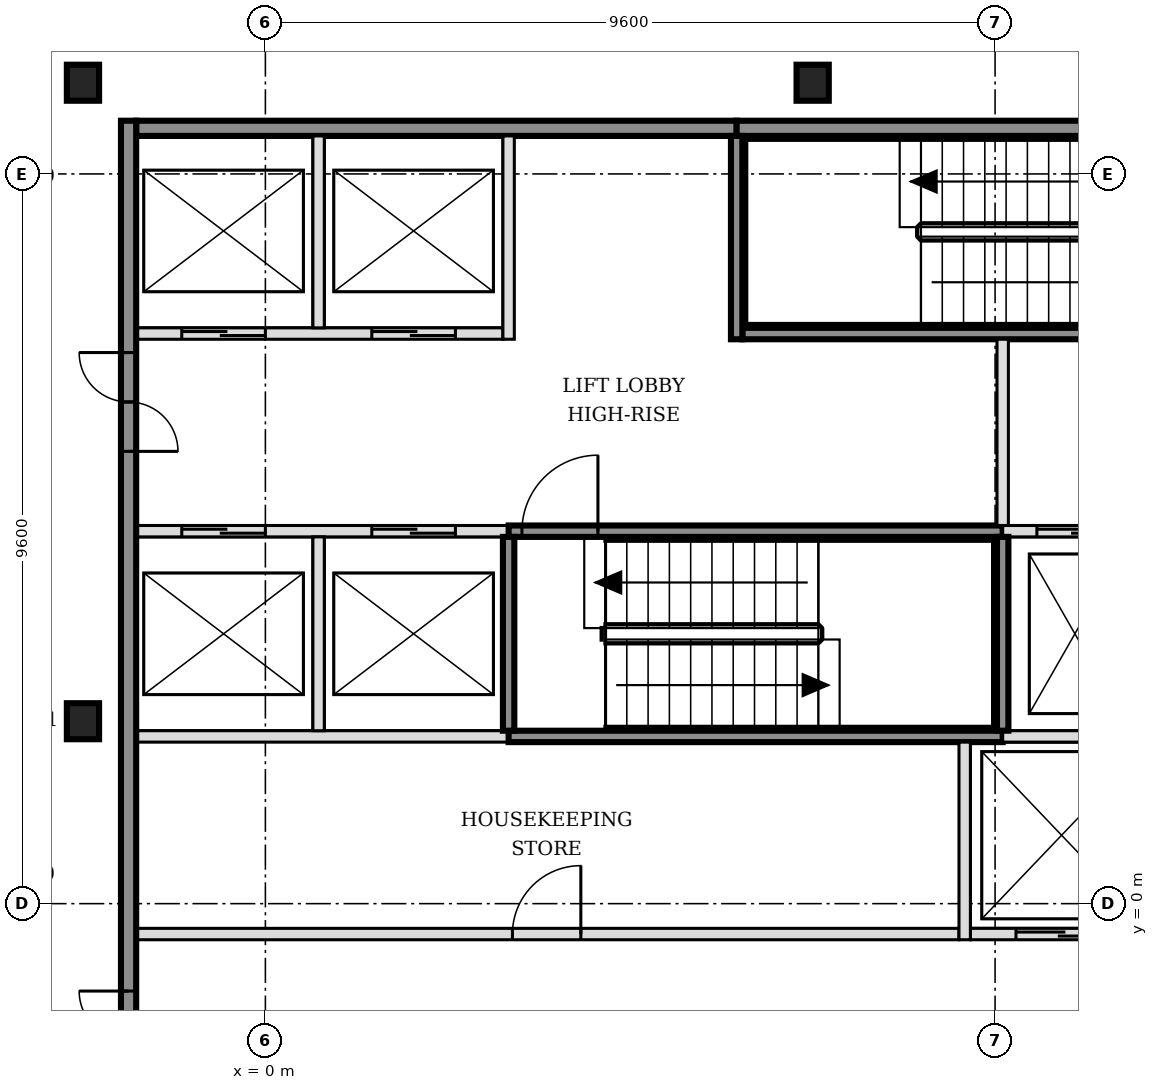
"""IFC4 building model, lengths in metres.
Left out: names, types, materials, properties, quantities, classifications, styles, units other than length and angle.
Written with IfcOpenShell. Run it as: python <this file> out.ifc"""

import sys

from ifc_helpers import new_model, si_unit, direction, frame, frame_2d, origin, origin_2d, place, context, subcontext, project, spatial, rectangle, i_section, extrude, element, fill, save


model = new_model("IFC4")
c1 = context("Model", 3, precision=1e-05, world=origin(), true_north=direction((0.0, 1.0)))
c2 = subcontext(c1, "Body", "Model", "MODEL_VIEW")
j1 = project(units=[si_unit("LENGTHUNIT", "METRE"), si_unit("PLANEANGLEUNIT", "RADIAN")], contexts=[c1])
p1 = place(None, origin())
s1 = spatial("IfcSite", under=j1, at=p1, CompositionType="ELEMENT")
p2 = place(p1, origin())
s2 = spatial("IfcBuilding", under=s1, at=p2, CompositionType="ELEMENT")
p3 = place(p2, frame((0.0, 0.0, 147.0)))
s3 = spatial("IfcBuildingStorey", under=s2, at=p3, CompositionType="ELEMENT", Elevation=147.0)
for number, where, z_axis, x_axis in (
    (1, (-2.4, 2.4, -0.15), (0.0, 0.0, 1.0), (1.0, 0.0, 0.0)),
    (2, (-2.4, 10.8, -0.15), (0.0, 0.0, 1.0), (1.0, 0.0, 0.0)),
    (3, (7.2, 10.8, -0.15), (0.0, 0.0, 1.0), (1.0, 0.0, 0.0)),
):
    element("IfcColumn", number, at=place(p3, frame(where, z_axis=z_axis, x_axis=x_axis)), inside=s3, PredefinedType="COLUMN", context=c2, shape_type="SweptSolid", body=[
        extrude(i_section(OverallWidth=0.424, OverallDepth=0.474, WebThickness=0.048, FlangeThickness=0.077, FilletRadius=0.015, at=origin_2d()), origin(), (0.0, 0.0, 1.0), 3.6),
    ])
p4 = place(p3, frame((-1.7, -0.4, 0.0), z_axis=(0.0, 0.0, 1.0), x_axis=(1.0, 0.0, 0.0)))
e4 = element("IfcWall", 4, at=p4, inside=s3, PredefinedType="PARTITIONING", context=c2, shape_type="SweptSolid", body=[
    extrude(rectangle(XDim=10.825, YDim=0.15, at=frame_2d((5.413, 0.0))), origin(), (0.0, 0.0, 1.0), 3.45),
])
p5 = place(p4, frame((4.95, 0.0, 0.0)))
e5 = element("IfcOpeningElement", 5, at=p5, cuts=e4, PredefinedType="OPENING", context=c2, shape_type="SweptSolid", body=[
    extrude(rectangle(XDim=0.9, YDim=2.1, at=frame_2d((0.45, 1.05))), frame((0.0, 0.085, 0.0), z_axis=(0.0, -1.0, 0.0), x_axis=(1.0, 0.0, 0.0)), (0.0, 0.0, 1.0), 0.17),
])
p6 = place(p3, frame((9.275, -0.4, 0.0), z_axis=(0.0, 0.0, 1.0), x_axis=(1.0, 0.0, 0.0)))
e6 = element("IfcWall", 6, at=p6, inside=s3, PredefinedType="SOLIDWALL", context=c2, shape_type="SweptSolid", body=[
    extrude(rectangle(XDim=4.95, YDim=0.15, at=frame_2d((2.475, 0.0))), origin(), (0.0, 0.0, 1.0), 3.45),
])
p7 = place(p6, frame((0.6, 0.0, 0.0)))
e7 = element("IfcOpeningElement", 7, at=p7, cuts=e6, PredefinedType="OPENING", context=c2, shape_type="SweptSolid", body=[
    extrude(rectangle(XDim=1.2, YDim=2.1, at=frame_2d((0.6, 1.05))), frame((0.0, 0.085, 0.0), z_axis=(0.0, -1.0, 0.0), x_axis=(1.0, 0.0, 0.0)), (0.0, 0.0, 1.0), 0.17),
])
p8 = place(p6, frame((3.15, 0.0, 0.0)))
e8 = element("IfcOpeningElement", 8, at=p8, cuts=e6, PredefinedType="OPENING", context=c2, shape_type="SweptSolid", body=[
    extrude(rectangle(XDim=1.2, YDim=2.1, at=frame_2d((0.6, 1.05))), frame((0.0, 0.085, 0.0), z_axis=(0.0, -1.0, 0.0), x_axis=(1.0, 0.0, 0.0)), (0.0, 0.0, 1.0), 0.17),
])
p9 = place(p3, frame((-1.7, 2.2, 0.0), z_axis=(0.0, 0.0, 1.0), x_axis=(1.0, 0.0, 0.0)))
e9 = element("IfcWall", 9, at=p9, inside=s3, PredefinedType="SOLIDWALL", context=c2, shape_type="SweptSolid", body=[
    extrude(rectangle(XDim=4.9, YDim=0.15, at=frame_2d((2.45, 0.0))), origin(), (0.0, 0.0, 1.0), 3.45),
])
p10 = place(p3, frame((3.2, 2.2, 0.0), z_axis=(0.0, 0.0, 1.0), x_axis=(1.0, 0.0, 0.0)))
e10 = element("IfcWall", 10, at=p10, inside=s3, PredefinedType="SOLIDWALL", context=c2, shape_type="SweptSolid", body=[
    extrude(rectangle(XDim=6.5, YDim=0.15, at=frame_2d((3.25, 0.0))), origin(), (0.0, 0.0, 1.0), 3.45),
])
p11 = place(p3, frame((9.7, 2.2, 0.0), z_axis=(0.0, 0.0, 1.0), x_axis=(1.0, 0.0, 0.0)))
e11 = element("IfcWall", 11, at=p11, inside=s3, PredefinedType="SOLIDWALL", context=c2, shape_type="SweptSolid", body=[
    extrude(rectangle(XDim=4.525, YDim=0.15, at=frame_2d((2.263, 0.0))), origin(), (0.0, 0.0, 1.0), 3.45),
])
p12 = place(p3, frame((-1.7, 4.9, 0.0), z_axis=(0.0, 0.0, 1.0), x_axis=(1.0, 0.0, 0.0)))
e12 = element("IfcWall", 12, at=p12, inside=s3, PredefinedType="SOLIDWALL", context=c2, shape_type="SweptSolid", body=[
    extrude(rectangle(XDim=4.9, YDim=0.15, at=frame_2d((2.45, 0.0))), origin(), (0.0, 0.0, 1.0), 3.45),
])
p13 = place(p12, frame((0.6, 0.0, 0.0)))
e13 = element("IfcOpeningElement", 13, at=p13, cuts=e12, PredefinedType="OPENING", context=c2, shape_type="SweptSolid", body=[
    extrude(rectangle(XDim=1.1, YDim=2.1, at=frame_2d((0.55, 1.05))), frame((0.0, 0.085, 0.0), z_axis=(0.0, -1.0, 0.0), x_axis=(1.0, 0.0, 0.0)), (0.0, 0.0, 1.0), 0.17),
])
p14 = place(p12, frame((3.1, 0.0, 0.0)))
e14 = element("IfcOpeningElement", 14, at=p14, cuts=e12, PredefinedType="OPENING", context=c2, shape_type="SweptSolid", body=[
    extrude(rectangle(XDim=1.1, YDim=2.1, at=frame_2d((0.55, 1.05))), frame((0.0, 0.085, 0.0), z_axis=(0.0, -1.0, 0.0), x_axis=(1.0, 0.0, 0.0)), (0.0, 0.0, 1.0), 0.17),
])
p15 = place(p3, frame((3.2, 4.9, 0.0), z_axis=(0.0, 0.0, 1.0), x_axis=(1.0, 0.0, 0.0)))
e15 = element("IfcWall", 15, at=p15, inside=s3, PredefinedType="SOLIDWALL", context=c2, shape_type="SweptSolid", body=[
    extrude(rectangle(XDim=6.5, YDim=0.15, at=frame_2d((3.25, 0.0))), origin(), (0.0, 0.0, 1.0), 3.45),
])
p16 = place(p15, frame((0.175, 0.0, 0.0)))
e16 = element("IfcOpeningElement", 16, at=p16, cuts=e15, PredefinedType="OPENING", context=c2, shape_type="SweptSolid", body=[
    extrude(rectangle(XDim=1.0, YDim=2.1, at=frame_2d((0.5, 1.05))), frame((0.0, 0.085, 0.0), z_axis=(0.0, -1.0, 0.0), x_axis=(1.0, 0.0, 0.0)), (0.0, 0.0, 1.0), 0.17),
])
p17 = place(p3, frame((9.7, 4.9, 0.0), z_axis=(0.0, 0.0, 1.0), x_axis=(1.0, 0.0, 0.0)))
e17 = element("IfcWall", 17, at=p17, inside=s3, PredefinedType="SOLIDWALL", context=c2, shape_type="SweptSolid", body=[
    extrude(rectangle(XDim=6.4, YDim=0.15, at=frame_2d((3.2, 0.0))), origin(), (0.0, 0.0, 1.0), 3.45),
])
p18 = place(p17, frame((0.45, 0.0, 0.0)))
e18 = element("IfcOpeningElement", 18, at=p18, cuts=e17, PredefinedType="OPENING", context=c2, shape_type="SweptSolid", body=[
    extrude(rectangle(XDim=1.0, YDim=2.1, at=frame_2d((0.5, 1.05))), frame((0.0, 0.085, 0.0), z_axis=(0.0, -1.0, 0.0), x_axis=(1.0, 0.0, 0.0)), (0.0, 0.0, 1.0), 0.17),
])
p19 = place(p17, frame((2.35, 0.0, 0.0)))
e19 = element("IfcOpeningElement", 19, at=p19, cuts=e17, PredefinedType="OPENING", context=c2, shape_type="SweptSolid", body=[
    extrude(rectangle(XDim=1.0, YDim=2.1, at=frame_2d((0.5, 1.05))), frame((0.0, 0.085, 0.0), z_axis=(0.0, -1.0, 0.0), x_axis=(1.0, 0.0, 0.0)), (0.0, 0.0, 1.0), 0.17),
])
p20 = place(p17, frame((4.7, 0.0, 0.0)))
e20 = element("IfcOpeningElement", 20, at=p20, cuts=e17, PredefinedType="OPENING", context=c2, shape_type="SweptSolid", body=[
    extrude(rectangle(XDim=0.9, YDim=2.1, at=frame_2d((0.45, 1.05))), frame((0.0, 0.085, 0.0), z_axis=(0.0, -1.0, 0.0), x_axis=(1.0, 0.0, 0.0)), (0.0, 0.0, 1.0), 0.17),
])
p21 = place(p3, frame((-1.7, 7.5, 0.0), z_axis=(0.0, 0.0, 1.0), x_axis=(1.0, 0.0, 0.0)))
e21 = element("IfcWall", 21, at=p21, inside=s3, PredefinedType="SOLIDWALL", context=c2, shape_type="SweptSolid", body=[
    extrude(rectangle(XDim=4.825, YDim=0.15, at=frame_2d((2.413, 0.0))), origin(), (0.0, 0.0, 1.0), 3.45),
])
p22 = place(p21, frame((0.6, 0.0, 0.0)))
e22 = element("IfcOpeningElement", 22, at=p22, cuts=e21, PredefinedType="OPENING", context=c2, shape_type="SweptSolid", body=[
    extrude(rectangle(XDim=1.1, YDim=2.1, at=frame_2d((0.55, 1.05))), frame((0.0, 0.085, 0.0), z_axis=(0.0, -1.0, 0.0), x_axis=(1.0, 0.0, 0.0)), (0.0, 0.0, 1.0), 0.17),
])
p23 = place(p21, frame((3.1, 0.0, 0.0)))
e23 = element("IfcOpeningElement", 23, at=p23, cuts=e21, PredefinedType="OPENING", context=c2, shape_type="SweptSolid", body=[
    extrude(rectangle(XDim=1.1, YDim=2.1, at=frame_2d((0.55, 1.05))), frame((0.0, 0.085, 0.0), z_axis=(0.0, -1.0, 0.0), x_axis=(1.0, 0.0, 0.0)), (0.0, 0.0, 1.0), 0.17),
])
p24 = place(p3, frame((6.275, 7.5, 0.0), z_axis=(0.0, 0.0, 1.0), x_axis=(1.0, 0.0, 0.0)))
e24 = element("IfcWall", 24, at=p24, inside=s3, PredefinedType="SOLIDWALL", context=c2, shape_type="SweptSolid", body=[
    extrude(rectangle(XDim=6.425, YDim=0.15, at=frame_2d((3.212, 0.0))), origin(), (0.0, 0.0, 1.0), 3.45),
])
p25 = place(p24, frame((5.225, 0.0, 0.0)))
e25 = element("IfcOpeningElement", 25, at=p25, cuts=e24, PredefinedType="OPENING", context=c2, shape_type="SweptSolid", body=[
    extrude(rectangle(XDim=1.0, YDim=2.1, at=frame_2d((0.5, 1.05))), frame((0.0, 0.085, 0.0), z_axis=(0.0, -1.0, 0.0), x_axis=(1.0, 0.0, 0.0)), (0.0, 0.0, 1.0), 0.17),
])
p26 = place(p3, frame((-1.7, 10.2, 0.0), z_axis=(0.0, 0.0, 1.0), x_axis=(1.0, 0.0, 0.0)))
e26 = element("IfcWall", 26, at=p26, inside=s3, PredefinedType="SOLIDWALL", context=c2, shape_type="SweptSolid", body=[
    extrude(rectangle(XDim=7.9, YDim=0.2, at=frame_2d((3.95, 0.0))), origin(), (0.0, 0.0, 1.0), 3.45),
])
p27 = place(p3, frame((6.2, 10.2, 0.0), z_axis=(0.0, 0.0, 1.0), x_axis=(1.0, 0.0, 0.0)))
e27 = element("IfcWall", 27, at=p27, inside=s3, PredefinedType="SOLIDWALL", context=c2, shape_type="SweptSolid", body=[
    extrude(rectangle(XDim=6.5, YDim=0.2, at=frame_2d((3.25, 0.0))), origin(), (0.0, 0.0, 1.0), 3.45),
])
p28 = place(p3, frame((-1.8, -5.5, 0.0), z_axis=(0.0, 0.0, 1.0), x_axis=(0.0, 1.0, 0.0)))
e28 = element("IfcWall", 28, at=p28, inside=s3, PredefinedType="SOLIDWALL", context=c2, shape_type="SweptSolid", body=[
    extrude(rectangle(XDim=15.8, YDim=0.2, at=frame_2d((7.9, 0.0))), origin(), (0.0, 0.0, 1.0), 3.45),
])
p29 = place(p28, frame((3.05, 0.0, 0.0)))
e29 = element("IfcOpeningElement", 29, at=p29, cuts=e28, PredefinedType="OPENING", context=c2, shape_type="SweptSolid", body=[
    extrude(rectangle(XDim=1.3, YDim=2.1, at=frame_2d((0.65, 1.05))), frame((0.0, 0.11, 0.0), z_axis=(0.0, -1.0, 0.0), x_axis=(1.0, 0.0, 0.0)), (0.0, 0.0, 1.0), 0.22),
])
p30 = place(p28, frame((11.45, 0.0, 0.0)))
e30 = element("IfcOpeningElement", 30, at=p30, cuts=e28, PredefinedType="OPENING", context=c2, shape_type="SweptSolid", body=[
    extrude(rectangle(XDim=1.3, YDim=2.1, at=frame_2d((0.65, 1.05))), frame((0.0, 0.11, 0.0), z_axis=(0.0, -1.0, 0.0), x_axis=(1.0, 0.0, 0.0)), (0.0, 0.0, 1.0), 0.22),
])
p31 = place(p3, frame((0.7, 2.275, 0.0), z_axis=(0.0, 0.0, 1.0), x_axis=(0.0, 1.0, 0.0)))
e31 = element("IfcWall", 31, at=p31, inside=s3, PredefinedType="SOLIDWALL", context=c2, shape_type="SweptSolid", body=[
    extrude(rectangle(XDim=2.55, YDim=0.15, at=frame_2d((1.275, 0.0))), origin(), (0.0, 0.0, 1.0), 3.45),
])
p32 = place(p3, frame((0.7, 7.575, 0.0), z_axis=(0.0, 0.0, 1.0), x_axis=(0.0, 1.0, 0.0)))
e32 = element("IfcWall", 32, at=p32, inside=s3, PredefinedType="SOLIDWALL", context=c2, shape_type="SweptSolid", body=[
    extrude(rectangle(XDim=2.525, YDim=0.15, at=frame_2d((1.263, 0.0))), origin(), (0.0, 0.0, 1.0), 3.45),
])
p33 = place(p3, frame((3.2, 2.275, 0.0), z_axis=(0.0, 0.0, 1.0), x_axis=(0.0, 1.0, 0.0)))
e33 = element("IfcWall", 33, at=p33, inside=s3, PredefinedType="SOLIDWALL", context=c2, shape_type="SweptSolid", body=[
    extrude(rectangle(XDim=2.55, YDim=0.15, at=frame_2d((1.275, 0.0))), origin(), (0.0, 0.0, 1.0), 3.45),
])
for number, where, z_axis, x_axis in (
    (34, (3.2, 7.425, 0.0), (0.0, 0.0, 1.0), (0.0, 1.0, 0.0)),
    (35, (6.2, 7.425, 0.0), (0.0, 0.0, 1.0), (0.0, 1.0, 0.0)),
):
    element("IfcWall", number, at=place(p3, frame(where, z_axis=z_axis, x_axis=x_axis)), inside=s3, PredefinedType="SOLIDWALL", context=c2, shape_type="SweptSolid", body=[
        extrude(rectangle(XDim=2.675, YDim=0.15, at=frame_2d((1.337, 0.0))), origin(), (0.0, 0.0, 1.0), 3.45),
    ])
p34 = place(p3, frame((9.2, -0.475, 0.0), z_axis=(0.0, 0.0, 1.0), x_axis=(0.0, 1.0, 0.0)))
e36 = element("IfcWall", 36, at=p34, inside=s3, PredefinedType="SOLIDWALL", context=c2, shape_type="SweptSolid", body=[
    extrude(rectangle(XDim=2.6, YDim=0.15, at=frame_2d((1.3, 0.0))), origin(), (0.0, 0.0, 1.0), 3.45),
])
p35 = place(p3, frame((9.7, 2.275, 0.0), z_axis=(0.0, 0.0, 1.0), x_axis=(0.0, 1.0, 0.0)))
e37 = element("IfcWall", 37, at=p35, inside=s3, PredefinedType="SOLIDWALL", context=c2, shape_type="SweptSolid", body=[
    extrude(rectangle(XDim=2.55, YDim=0.15, at=frame_2d((1.275, 0.0))), origin(), (0.0, 0.0, 1.0), 3.45),
])
p36 = place(p3, frame((9.7, 4.975, 0.0), z_axis=(0.0, 0.0, 1.0), x_axis=(0.0, 1.0, 0.0)))
e38 = element("IfcWall", 38, at=p36, inside=s3, PredefinedType="SOLIDWALL", context=c2, shape_type="SweptSolid", body=[
    extrude(rectangle(XDim=2.45, YDim=0.15, at=frame_2d((1.225, 0.0))), origin(), (0.0, 0.0, 1.0), 3.45),
])
p37 = place(p3, frame((-12.075, 9.319, 0.0), z_axis=(0.0, 0.0, 1.0), x_axis=(0.707106781187, 0.707106781187, 0.0)))
e39 = element("IfcWall", 39, at=p37, inside=s3, PredefinedType="PARTITIONING", context=c2, shape_type="SweptSolid", body=[
    extrude(rectangle(XDim=13.793, YDim=0.15, at=frame_2d((6.896, 0.0))), origin(), (0.0, 0.0, 1.0), 2.73),
])
p38 = place(p37, frame((11.692, 0.0, 0.0)))
e40 = element("IfcOpeningElement", 40, at=p38, cuts=e39, PredefinedType="OPENING", context=c2, shape_type="SweptSolid", body=[
    extrude(rectangle(XDim=0.9, YDim=2.1, at=frame_2d((0.45, 1.05))), frame((0.0, 0.085, 0.0), z_axis=(0.0, -1.0, 0.0), x_axis=(1.0, 0.0, 0.0)), (0.0, 0.0, 1.0), 0.17),
])
p39 = place(p37, frame((7.376, 0.0, 0.0)))
e41 = element("IfcOpeningElement", 41, at=p39, cuts=e39, PredefinedType="OPENING", context=c2, shape_type="SweptSolid", body=[
    extrude(rectangle(XDim=0.9, YDim=2.1, at=frame_2d((0.45, 1.05))), frame((0.0, 0.085, 0.0), z_axis=(0.0, -1.0, 0.0), x_axis=(1.0, 0.0, 0.0)), (0.0, 0.0, 1.0), 0.17),
])
p40 = place(p37, frame((3.62, 0.0, 0.0)))
e42 = element("IfcOpeningElement", 42, at=p40, cuts=e39, PredefinedType="OPENING", context=c2, shape_type="SweptSolid", body=[
    extrude(rectangle(XDim=0.9, YDim=2.1, at=frame_2d((0.45, 1.05))), frame((0.0, 0.085, 0.0), z_axis=(0.0, -1.0, 0.0), x_axis=(1.0, 0.0, 0.0)), (0.0, 0.0, 1.0), 0.17),
])
p41 = place(p7, origin())
e43 = element("IfcDoor", 43, at=p41, inside=s3, OperationType="DOUBLE_DOOR_SLIDING", PredefinedType="DOOR", context=c2, shape_type="SweptSolid", body=[
    extrude(rectangle(XDim=1.2, YDim=2.1, at=frame_2d((0.6, 1.05))), frame((0.0, 0.025, 0.0), z_axis=(0.0, -1.0, 0.0), x_axis=(1.0, 0.0, 0.0)), (0.0, 0.0, 1.0), 0.05),
])
fill(e7, e43)
p42 = place(p13, origin())
e44 = element("IfcDoor", 44, at=p42, inside=s3, OperationType="DOUBLE_DOOR_SLIDING", PredefinedType="DOOR", context=c2, shape_type="SweptSolid", body=[
    extrude(rectangle(XDim=1.1, YDim=2.1, at=frame_2d((0.55, 1.05))), frame((0.0, 0.025, 0.0), z_axis=(0.0, -1.0, 0.0), x_axis=(1.0, 0.0, 0.0)), (0.0, 0.0, 1.0), 0.05),
])
fill(e13, e44)
p43 = place(p14, origin())
e45 = element("IfcDoor", 45, at=p43, inside=s3, OperationType="DOUBLE_DOOR_SLIDING", PredefinedType="DOOR", context=c2, shape_type="SweptSolid", body=[
    extrude(rectangle(XDim=1.1, YDim=2.1, at=frame_2d((0.55, 1.05))), frame((0.0, 0.025, 0.0), z_axis=(0.0, -1.0, 0.0), x_axis=(1.0, 0.0, 0.0)), (0.0, 0.0, 1.0), 0.05),
])
fill(e14, e45)
p44 = place(p22, origin())
e46 = element("IfcDoor", 46, at=p44, inside=s3, OperationType="DOUBLE_DOOR_SLIDING", PredefinedType="DOOR", context=c2, shape_type="SweptSolid", body=[
    extrude(rectangle(XDim=1.1, YDim=2.1, at=frame_2d((0.55, 1.05))), frame((0.0, 0.025, 0.0), z_axis=(0.0, -1.0, 0.0), x_axis=(1.0, 0.0, 0.0)), (0.0, 0.0, 1.0), 0.05),
])
fill(e22, e46)
p45 = place(p23, origin())
e47 = element("IfcDoor", 47, at=p45, inside=s3, OperationType="DOUBLE_DOOR_SLIDING", PredefinedType="DOOR", context=c2, shape_type="SweptSolid", body=[
    extrude(rectangle(XDim=1.1, YDim=2.1, at=frame_2d((0.55, 1.05))), frame((0.0, 0.025, 0.0), z_axis=(0.0, -1.0, 0.0), x_axis=(1.0, 0.0, 0.0)), (0.0, 0.0, 1.0), 0.05),
])
fill(e23, e47)
p46 = place(p18, origin())
e48 = element("IfcDoor", 48, at=p46, inside=s3, OperationType="DOUBLE_DOOR_SLIDING", PredefinedType="DOOR", context=c2, shape_type="SweptSolid", body=[
    extrude(rectangle(XDim=1.0, YDim=2.1, at=frame_2d((0.5, 1.05))), frame((0.0, 0.025, 0.0), z_axis=(0.0, -1.0, 0.0), x_axis=(1.0, 0.0, 0.0)), (0.0, 0.0, 1.0), 0.05),
])
fill(e18, e48)
p47 = place(p16, origin())
e49 = element("IfcDoor", 49, at=p47, inside=s3, OperationType="SINGLE_SWING_RIGHT", PredefinedType="DOOR", context=c2, shape_type="SweptSolid", body=[
    extrude(rectangle(XDim=1.0, YDim=2.1, at=frame_2d((0.5, 1.05))), frame((0.0, 0.025, 0.0), z_axis=(0.0, -1.0, 0.0), x_axis=(1.0, 0.0, 0.0)), (0.0, 0.0, 1.0), 0.05),
])
fill(e16, e49)
p48 = place(p29, origin())
e50 = element("IfcDoor", 50, at=p48, inside=s3, OperationType="DOUBLE_DOOR_SINGLE_SWING", PredefinedType="DOOR", context=c2, shape_type="SweptSolid", body=[
    extrude(rectangle(XDim=1.3, YDim=2.1, at=frame_2d((0.65, 1.05))), frame((0.0, 0.025, 0.0), z_axis=(0.0, -1.0, 0.0), x_axis=(1.0, 0.0, 0.0)), (0.0, 0.0, 1.0), 0.05),
])
fill(e29, e50)
p49 = place(p30, origin())
e51 = element("IfcDoor", 51, at=p49, inside=s3, OperationType="DOUBLE_DOOR_SINGLE_SWING", PredefinedType="DOOR", context=c2, shape_type="SweptSolid", body=[
    extrude(rectangle(XDim=1.3, YDim=2.1, at=frame_2d((0.65, 1.05))), frame((0.0, 0.025, 0.0), z_axis=(0.0, -1.0, 0.0), x_axis=(1.0, 0.0, 0.0)), (0.0, 0.0, 1.0), 0.05),
])
fill(e30, e51)
p50 = place(p5, origin())
e52 = element("IfcDoor", 52, at=p50, inside=s3, OperationType="SINGLE_SWING_RIGHT", PredefinedType="DOOR", context=c2, shape_type="SweptSolid", body=[
    extrude(rectangle(XDim=0.9, YDim=2.1, at=frame_2d((0.45, 1.05))), frame((0.0, 0.025, 0.0), z_axis=(0.0, -1.0, 0.0), x_axis=(1.0, 0.0, 0.0)), (0.0, 0.0, 1.0), 0.05),
])
fill(e5, e52)
save(model, sys.argv[1])
